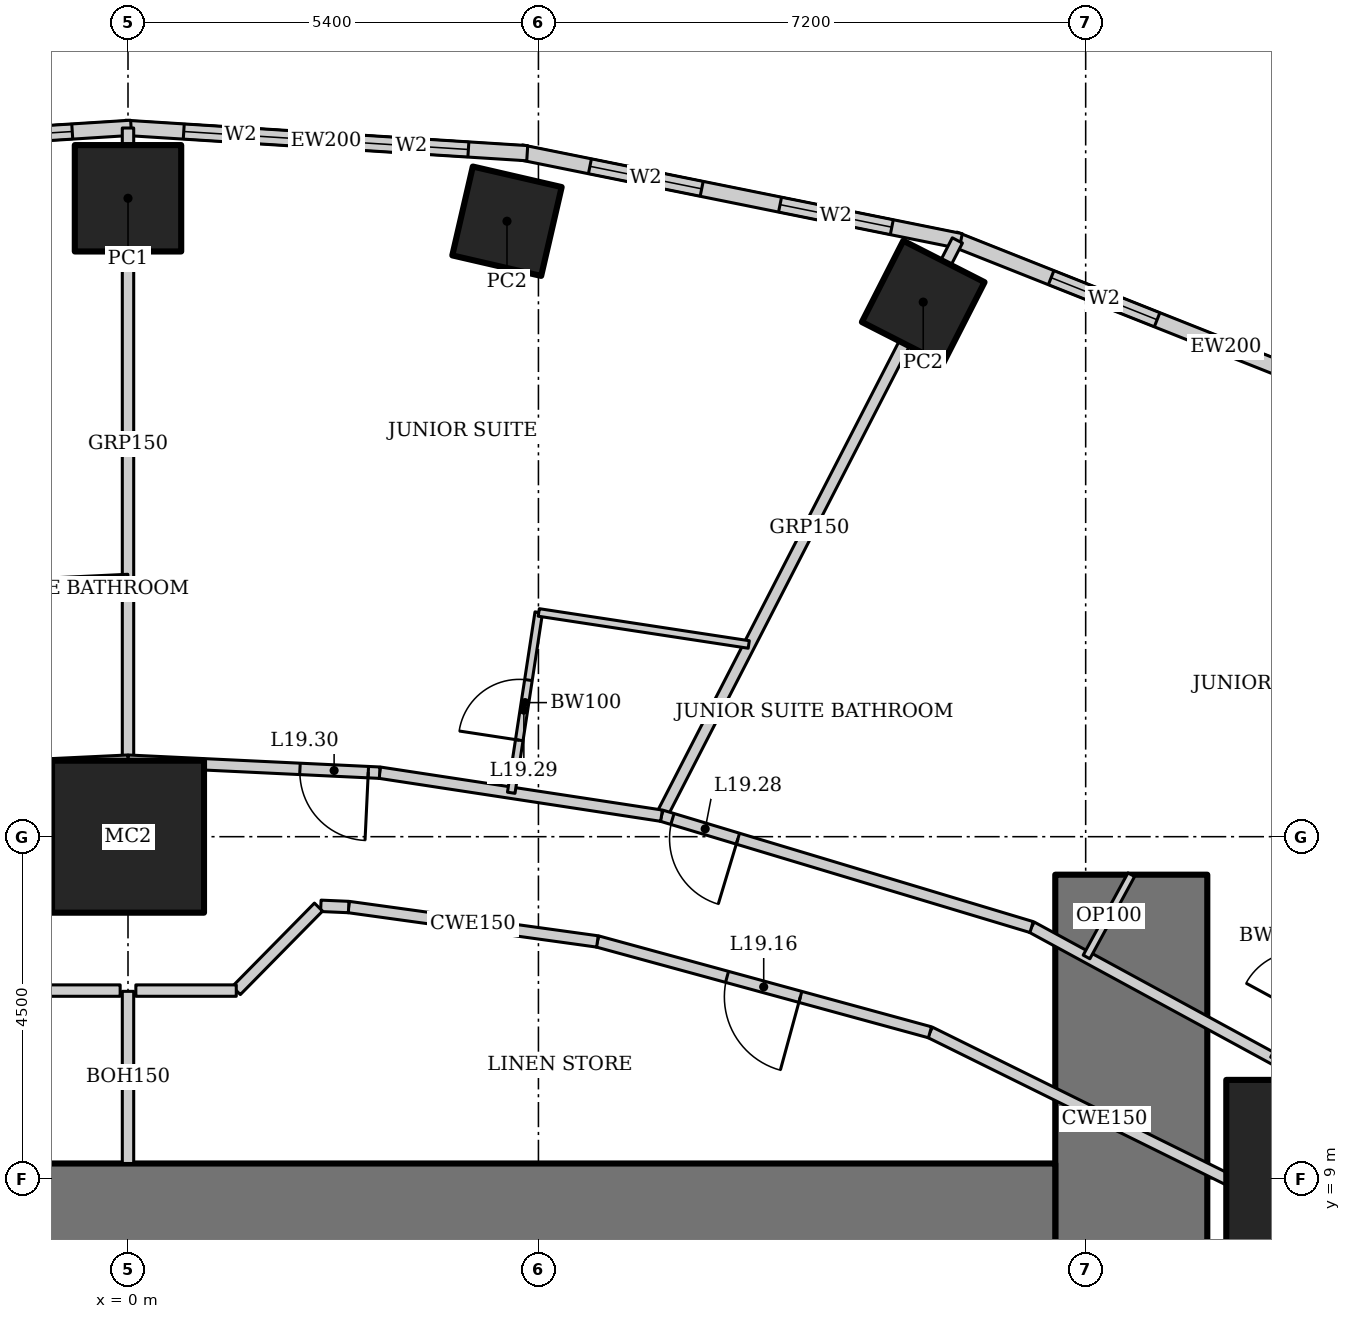
"""IFC4 building model, lengths in metres.
Left out: names, types, materials, properties, quantities, classifications, styles, units other than length and angle.
Written with IfcOpenShell. Run it as: python <this file> out.ifc"""

import sys

from ifc_helpers import new_model, si_unit, direction, frame, frame_2d, origin, origin_2d, place, context, subcontext, project, spatial, rectangle, hollow_rectangle, extrude, element, fill, save


model = new_model("IFC4")
c1 = context("Model", 3, precision=1e-05, world=origin(), true_north=direction((0.0, 1.0)))
c2 = subcontext(c1, "Body", "Model", "MODEL_VIEW")
j1 = project(units=[si_unit("LENGTHUNIT", "METRE"), si_unit("PLANEANGLEUNIT", "RADIAN")], contexts=[c1])
p1 = place(None, origin())
s1 = spatial("IfcSite", under=j1, at=p1, CompositionType="ELEMENT")
p2 = place(p1, origin())
s2 = spatial("IfcBuilding", under=s1, at=p2, CompositionType="ELEMENT")
p3 = place(p2, frame((0.0, 0.0, 83.8)))
s3 = spatial("IfcBuildingStorey", under=s2, at=p3, CompositionType="ELEMENT", Elevation=83.8)
p4 = place(p3, frame((15.75, 9.0, 0.0), z_axis=(0.0, 0.0, 1.0), x_axis=(1.0, 0.0, 0.0)))
e1 = element("IfcColumn", 1, at=p4, inside=s3, PredefinedType="COLUMN", context=c2, shape_type="SweptSolid", body=[
    extrude(hollow_rectangle(XDim=2.6, YDim=2.6, WallThickness=0.13, at=origin_2d()), origin(), (0.0, 0.0, 1.0), 3.6),
])
p5 = place(p3, frame((0.0, 13.5, 0.0), z_axis=(0.0, 0.0, 1.0), x_axis=(1.0, 0.0, 0.0)))
e2 = element("IfcColumn", 2, at=p5, inside=s3, PredefinedType="COLUMN", context=c2, shape_type="SweptSolid", body=[
    extrude(hollow_rectangle(XDim=2.0, YDim=2.0, WallThickness=0.17, at=origin_2d()), origin(), (0.0, 0.0, 1.0), 3.6),
])
for number, where, z_axis, x_axis in (
    (3, (10.463, 20.534, 0.0), (0.0, 0.0, 1.0), (0.454, 0.891, 0.0)),
    (4, (4.986, 21.598, 0.0), (0.0, 0.0, 1.0), (0.225, 0.974, 0.0)),
):
    element("IfcColumn", number, at=place(p3, frame(where, z_axis=z_axis, x_axis=x_axis)), inside=s3, PredefinedType="COLUMN", context=c2, shape_type="SweptSolid", body=[
        extrude(hollow_rectangle(XDim=1.2, YDim=1.2, WallThickness=0.1, at=origin_2d()), origin(), (0.0, 0.0, 1.0), 3.6),
    ])
p6 = place(p3, frame((0.0, 21.9, 0.0), z_axis=(0.0, 0.0, 1.0), x_axis=(1.0, 0.0, 0.0)))
e5 = element("IfcColumn", 5, at=p6, inside=s3, PredefinedType="COLUMN", context=c2, shape_type="SweptSolid", body=[
    extrude(hollow_rectangle(XDim=1.4, YDim=1.4, WallThickness=0.1, at=origin_2d()), origin(), (0.0, 0.0, 1.0), 3.6),
])
p7 = place(p3, frame((13.2, -13.0, 0.0), z_axis=(0.0, 0.0, 1.0), x_axis=(0.0, 1.0, 0.0)))
e6 = element("IfcWall", 6, at=p7, inside=s3, PredefinedType="SHEAR", context=c2, shape_type="SweptSolid", body=[
    extrude(rectangle(XDim=26.0, YDim=2.0, at=frame_2d((13.0, 0.0))), origin(), (0.0, 0.0, 1.0), 3.6),
])
p8 = place(p7, frame((12.1, 0.0, 0.0)))
e7 = element("IfcOpeningElement", 7, at=p8, cuts=e6, PredefinedType="OPENING", context=c2, shape_type="SweptSolid", body=[
    extrude(rectangle(XDim=1.8, YDim=2.1, at=frame_2d((0.9, 1.05))), frame((0.0, 1.01, 0.0), z_axis=(0.0, -1.0, 0.0), x_axis=(1.0, 0.0, 0.0)), (0.0, 0.0, 1.0), 2.02),
])
p9 = place(p3, frame((12.2, 8.0, 0.0), z_axis=(0.0, 0.0, 1.0), x_axis=(-1.0, 0.0, 0.0)))
e8 = element("IfcWall", 8, at=p9, inside=s3, PredefinedType="SHEAR", context=c2, shape_type="SweptSolid", body=[
    extrude(rectangle(XDim=24.4, YDim=2.4, at=frame_2d((12.2, 0.0))), origin(), (0.0, 0.0, 1.0), 3.6),
])
p10 = place(p3, frame((18.018, 18.523, 0.0), z_axis=(0.0, 0.0, 1.0), x_axis=(-0.929358351251, 0.369178892895, 0.0)))
e9 = element("IfcWall", 9, at=p10, inside=s3, PredefinedType="SOLIDWALL", context=c2, shape_type="SweptSolid", body=[
    extrude(rectangle(XDim=7.692, YDim=0.2, at=frame_2d((3.846, 0.0))), origin(), (0.0, 0.0, 1.0), 3.45),
])
p11 = place(p10, frame((1.373, 0.0, 0.5)))
e10 = element("IfcOpeningElement", 10, at=p11, cuts=e9, PredefinedType="OPENING", context=c2, shape_type="SweptSolid", body=[
    extrude(rectangle(XDim=1.5, YDim=2.2, at=frame_2d((0.75, 1.1))), frame((0.0, 0.11, 0.0), z_axis=(0.0, -1.0, 0.0), x_axis=(1.0, 0.0, 0.0)), (0.0, 0.0, 1.0), 0.22),
])
p12 = place(p10, frame((4.819, 0.0, 0.5)))
e11 = element("IfcOpeningElement", 11, at=p12, cuts=e9, PredefinedType="OPENING", context=c2, shape_type="SweptSolid", body=[
    extrude(rectangle(XDim=1.5, YDim=2.2, at=frame_2d((0.75, 1.1))), frame((0.0, 0.11, 0.0), z_axis=(0.0, -1.0, 0.0), x_axis=(1.0, 0.0, 0.0)), (0.0, 0.0, 1.0), 0.22),
])
p13 = place(p3, frame((10.957, 21.337, 0.0), z_axis=(0.0, 0.0, 1.0), x_axis=(-0.980251657452, 0.197754110105, 0.0)))
e12 = element("IfcWall", 12, at=p13, inside=s3, PredefinedType="SOLIDWALL", context=c2, shape_type="SweptSolid", body=[
    extrude(rectangle(XDim=5.904, YDim=0.2, at=frame_2d((2.952, 0.0))), origin(), (0.0, 0.0, 1.0), 3.45),
])
p14 = place(p13, frame((0.926, 0.0, 0.5)))
e13 = element("IfcOpeningElement", 13, at=p14, cuts=e12, PredefinedType="OPENING", context=c2, shape_type="SweptSolid", body=[
    extrude(rectangle(XDim=1.5, YDim=2.2, at=frame_2d((0.75, 1.1))), frame((0.0, 0.11, 0.0), z_axis=(0.0, -1.0, 0.0), x_axis=(1.0, 0.0, 0.0)), (0.0, 0.0, 1.0), 0.22),
])
p15 = place(p13, frame((3.478, 0.0, 0.5)))
e14 = element("IfcOpeningElement", 14, at=p15, cuts=e12, PredefinedType="OPENING", context=c2, shape_type="SweptSolid", body=[
    extrude(rectangle(XDim=1.5, YDim=2.2, at=frame_2d((0.75, 1.1))), frame((0.0, 0.11, 0.0), z_axis=(0.0, -1.0, 0.0), x_axis=(1.0, 0.0, 0.0)), (0.0, 0.0, 1.0), 0.22),
])
p16 = place(p3, frame((5.253, 22.493, 0.0), z_axis=(0.0, 0.0, 1.0), x_axis=(-0.998018582375, 0.062919863585, 0.0)))
e15 = element("IfcWall", 15, at=p16, inside=s3, PredefinedType="SOLIDWALL", context=c2, shape_type="SweptSolid", body=[
    extrude(rectangle(XDim=5.304, YDim=0.2, at=frame_2d((2.652, 0.0))), origin(), (0.0, 0.0, 1.0), 3.45),
])
p17 = place(p16, frame((0.776, 0.0, 0.5)))
e16 = element("IfcOpeningElement", 16, at=p17, cuts=e15, PredefinedType="OPENING", context=c2, shape_type="SweptSolid", body=[
    extrude(rectangle(XDim=1.5, YDim=2.2, at=frame_2d((0.75, 1.1))), frame((0.0, 0.11, 0.0), z_axis=(0.0, -1.0, 0.0), x_axis=(1.0, 0.0, 0.0)), (0.0, 0.0, 1.0), 0.22),
])
p18 = place(p16, frame((3.028, 0.0, 0.5)))
e17 = element("IfcOpeningElement", 17, at=p18, cuts=e15, PredefinedType="OPENING", context=c2, shape_type="SweptSolid", body=[
    extrude(rectangle(XDim=1.5, YDim=2.2, at=frame_2d((0.75, 1.1))), frame((0.0, 0.11, 0.0), z_axis=(0.0, -1.0, 0.0), x_axis=(1.0, 0.0, 0.0)), (0.0, 0.0, 1.0), 0.22),
])
p19 = place(p3, frame((0.041, 22.827, 0.0), z_axis=(0.0, 0.0, 1.0), x_axis=(-0.998018582375, -0.062919863585, 0.0)))
e18 = element("IfcWall", 18, at=p19, inside=s3, PredefinedType="SOLIDWALL", context=c2, shape_type="SweptSolid", body=[
    extrude(rectangle(XDim=5.304, YDim=0.2, at=frame_2d((2.652, 0.0))), origin(), (0.0, 0.0, 1.0), 3.45),
])
p20 = place(p19, frame((0.776, 0.0, 0.5)))
e19 = element("IfcOpeningElement", 19, at=p20, cuts=e18, PredefinedType="OPENING", context=c2, shape_type="SweptSolid", body=[
    extrude(rectangle(XDim=1.5, YDim=2.2, at=frame_2d((0.75, 1.1))), frame((0.0, 0.11, 0.0), z_axis=(0.0, -1.0, 0.0), x_axis=(1.0, 0.0, 0.0)), (0.0, 0.0, 1.0), 0.22),
])
p21 = place(p19, frame((3.028, 0.0, 0.5)))
e20 = element("IfcOpeningElement", 20, at=p21, cuts=e18, PredefinedType="OPENING", context=c2, shape_type="SweptSolid", body=[
    extrude(rectangle(XDim=1.5, YDim=2.2, at=frame_2d((0.75, 1.1))), frame((0.0, 0.11, 0.0), z_axis=(0.0, -1.0, 0.0), x_axis=(1.0, 0.0, 0.0)), (0.0, 0.0, 1.0), 0.22),
])
p22 = place(p3, frame((10.912, 21.346, 0.0), z_axis=(0.0, 0.0, 1.0), x_axis=(-0.457327273085, -0.889298468059, 0.0)))
e21 = element("IfcWall", 21, at=p22, inside=s3, PredefinedType="PARTITIONING", context=c2, shape_type="SweptSolid", body=[
    extrude(rectangle(XDim=8.511, YDim=0.15, at=frame_2d((4.256, 0.0))), origin(), (0.0, 0.0, 1.0), 2.528),
])
p23 = place(p3, frame((0.0, 22.825, 0.0), z_axis=(0.0, 0.0, 1.0), x_axis=(0.0, -1.0, 0.0)))
e22 = element("IfcWall", 22, at=p23, inside=s3, PredefinedType="PARTITIONING", context=c2, shape_type="SweptSolid", body=[
    extrude(rectangle(XDim=8.325, YDim=0.15, at=frame_2d((4.162, 0.0))), origin(), (0.0, 0.0, 1.0), 2.924),
])
p24 = place(p3, frame((16.835, 9.62, 0.0), z_axis=(0.0, 0.0, 1.0), x_axis=(-0.878450059298, 0.477834169267, 0.0)))
e23 = element("IfcWall", 23, at=p24, inside=s3, PredefinedType="PARTITIONING", context=c2, shape_type="SweptSolid", body=[
    extrude(rectangle(XDim=5.631, YDim=0.15, at=frame_2d((2.815, 0.0))), origin(), (0.0, 0.0, 1.0), 3.45),
])
p25 = place(p3, frame((11.888, 12.311, 0.0), z_axis=(0.0, 0.0, 1.0), x_axis=(-0.957564241242, 0.288219922793, 0.0)))
e24 = element("IfcWall", 24, at=p25, inside=s3, PredefinedType="PARTITIONING", context=c2, shape_type="SweptSolid", body=[
    extrude(rectangle(XDim=5.085, YDim=0.15, at=frame_2d((2.542, 0.0))), origin(), (0.0, 0.0, 1.0), 3.45),
])
p26 = place(p25, frame((4.035, 0.0, 0.0)))
e25 = element("IfcOpeningElement", 25, at=p26, cuts=e24, PredefinedType="OPENING", context=c2, shape_type="SweptSolid", body=[
    extrude(rectangle(XDim=0.9, YDim=2.1, at=frame_2d((0.45, 1.05))), frame((0.0, 0.085, 0.0), z_axis=(0.0, -1.0, 0.0), x_axis=(1.0, 0.0, 0.0)), (0.0, 0.0, 1.0), 0.17),
])
p27 = place(p3, frame((7.019, 13.776, 0.0), z_axis=(0.0, 0.0, 1.0), x_axis=(-0.988564270062, 0.150800145746, 0.0)))
e26 = element("IfcWall", 26, at=p27, inside=s3, PredefinedType="PARTITIONING", context=c2, shape_type="SweptSolid", body=[
    extrude(rectangle(XDim=3.751, YDim=0.15, at=frame_2d((1.875, 0.0))), origin(), (0.0, 0.0, 1.0), 3.45),
])
p28 = place(p3, frame((3.311, 14.342, 0.0), z_axis=(0.0, 0.0, 1.0), x_axis=(-0.998863968075, 0.047652631422, 0.0)))
e27 = element("IfcWall", 27, at=p28, inside=s3, PredefinedType="PARTITIONING", context=c2, shape_type="SweptSolid", body=[
    extrude(rectangle(XDim=3.315, YDim=0.15, at=frame_2d((1.657, 0.0))), origin(), (0.0, 0.0, 1.0), 3.45),
])
p29 = place(p28, frame((0.15, 0.0, 0.0)))
e28 = element("IfcOpeningElement", 28, at=p29, cuts=e27, PredefinedType="OPENING", context=c2, shape_type="SweptSolid", body=[
    extrude(rectangle(XDim=0.9, YDim=2.1, at=frame_2d((0.45, 1.05))), frame((0.0, 0.085, 0.0), z_axis=(0.0, -1.0, 0.0), x_axis=(1.0, 0.0, 0.0)), (0.0, 0.0, 1.0), 0.17),
])
p30 = place(p3, frame((0.0, 14.5, 0.0), z_axis=(0.0, 0.0, 1.0), x_axis=(-0.998863968075, -0.047652631422, 0.0)))
e29 = element("IfcWall", 29, at=p30, inside=s3, PredefinedType="PARTITIONING", context=c2, shape_type="SweptSolid", body=[
    extrude(rectangle(XDim=3.315, YDim=0.15, at=frame_2d((1.657, 0.0))), origin(), (0.0, 0.0, 1.0), 3.45),
])
p31 = place(p3, frame((15.147, 8.656, 0.0), z_axis=(0.0, 0.0, 1.0), x_axis=(-0.89656943448, 0.442903205177, 0.0)))
e30 = element("IfcWall", 30, at=p31, inside=s3, PredefinedType="PARTITIONING", context=c2, shape_type="SweptSolid", body=[
    extrude(rectangle(XDim=5.126, YDim=0.15, at=frame_2d((2.563, 0.0))), origin(), (0.0, 0.0, 1.0), 3.45),
])
p32 = place(p3, frame((10.551, 10.926, 0.0), z_axis=(0.0, 0.0, 1.0), x_axis=(-0.964644466646, 0.263554648923, 0.0)))
e31 = element("IfcWall", 31, at=p32, inside=s3, PredefinedType="PARTITIONING", context=c2, shape_type="SweptSolid", body=[
    extrude(rectangle(XDim=4.535, YDim=0.15, at=frame_2d((2.268, 0.0))), origin(), (0.0, 0.0, 1.0), 3.45),
])
p33 = place(p32, frame((1.768, 0.0, 0.0)))
e32 = element("IfcOpeningElement", 32, at=p33, cuts=e31, PredefinedType="OPENING", context=c2, shape_type="SweptSolid", body=[
    extrude(rectangle(XDim=1.0, YDim=2.1, at=frame_2d((0.5, 1.05))), frame((0.0, 0.085, 0.0), z_axis=(0.0, -1.0, 0.0), x_axis=(1.0, 0.0, 0.0)), (0.0, 0.0, 1.0), 0.17),
])
p34 = place(p3, frame((6.176, 12.122, 0.0), z_axis=(0.0, 0.0, 1.0), x_axis=(-0.990563451353, 0.137054911782, 0.0)))
e33 = element("IfcWall", 33, at=p34, inside=s3, PredefinedType="PARTITIONING", context=c2, shape_type="SweptSolid", body=[
    extrude(rectangle(XDim=3.304, YDim=0.15, at=frame_2d((1.652, 0.0))), origin(), (0.0, 0.0, 1.0), 3.45),
])
p35 = place(p3, frame((15.078, 10.576, 0.0), z_axis=(0.0, 0.0, 1.0), x_axis=(0.477832549678, 0.878450940274, 0.0)))
e34 = element("IfcWall", 34, at=p35, inside=s3, PredefinedType="PARTITIONING", context=c2, shape_type="SweptSolid", body=[
    extrude(rectangle(XDim=2.4, YDim=0.1, at=frame_2d((1.2, 0.0))), origin(), (0.0, 0.0, 1.0), 3.45),
])
p36 = place(p35, frame((0.7, 0.0, 0.0)))
e35 = element("IfcOpeningElement", 35, at=p36, cuts=e34, PredefinedType="OPENING", context=c2, shape_type="SweptSolid", body=[
    extrude(rectangle(XDim=0.8, YDim=2.1, at=frame_2d((0.4, 1.05))), frame((0.0, 0.06, 0.0), z_axis=(0.0, -1.0, 0.0), x_axis=(1.0, 0.0, 0.0)), (0.0, 0.0, 1.0), 0.12),
])
p37 = place(p3, frame((5.042, 14.078, 0.0), z_axis=(0.0, 0.0, 1.0), x_axis=(0.150856962013, 0.988555601376, 0.0)))
e36 = element("IfcWall", 36, at=p37, inside=s3, PredefinedType="PARTITIONING", context=c2, shape_type="SweptSolid", body=[
    extrude(rectangle(XDim=2.4, YDim=0.1, at=frame_2d((1.2, 0.0))), origin(), (0.0, 0.0, 1.0), 3.45),
])
p38 = place(p37, frame((0.7, 0.0, 0.0)))
e37 = element("IfcOpeningElement", 37, at=p38, cuts=e36, PredefinedType="OPENING", context=c2, shape_type="SweptSolid", body=[
    extrude(rectangle(XDim=0.8, YDim=2.1, at=frame_2d((0.4, 1.05))), frame((0.0, 0.06, 0.0), z_axis=(0.0, -1.0, 0.0), x_axis=(1.0, 0.0, 0.0)), (0.0, 0.0, 1.0), 0.12),
])
p39 = place(p3, frame((5.404, 16.45, 0.0), z_axis=(0.0, 0.0, 1.0), x_axis=(0.988568792086, -0.150770498819, 0.0)))
e38 = element("IfcWall", 38, at=p39, inside=s3, PredefinedType="PARTITIONING", context=c2, shape_type="SweptSolid", body=[
    extrude(rectangle(XDim=2.795, YDim=0.1, at=frame_2d((1.397, 0.0))), origin(), (0.0, 0.0, 1.0), 3.45),
])
p40 = place(p3, frame((-2.112, 16.802, 0.0), z_axis=(0.0, 0.0, 1.0), x_axis=(0.998862383453, 0.047685835668, 0.0)))
e39 = element("IfcWall", 39, at=p40, inside=s3, PredefinedType="PARTITIONING", context=c2, shape_type="SweptSolid", body=[
    extrude(rectangle(XDim=2.115, YDim=0.1, at=frame_2d((1.057, 0.0))), origin(), (0.0, 0.0, 1.0), 3.45),
])
p41 = place(p3, frame((13.2, 13.0, 0.0), z_axis=(0.0, 0.0, 1.0), x_axis=(-0.477852414256, -0.878440134665, 0.0)))
e40 = element("IfcWall", 40, at=p41, inside=s3, PredefinedType="PARTITIONING", context=c2, shape_type="SweptSolid", body=[
    extrude(rectangle(XDim=1.232, YDim=0.1, at=frame_2d((0.616, 0.0))), origin(), (0.0, 0.0, 1.0), 3.45),
])
p42 = place(p3, frame((2.903, 12.574, 0.0), z_axis=(0.0, 0.0, 1.0), x_axis=(-0.999061181733, 0.04332153223, 0.0)))
e41 = element("IfcWall", 41, at=p42, inside=s3, PredefinedType="PARTITIONING", context=c2, shape_type="SweptSolid", body=[
    extrude(rectangle(XDim=0.366, YDim=0.15, at=frame_2d((0.183, 0.0))), origin(), (0.0, 0.0, 1.0), 3.45),
])
p43 = place(p3, frame((0.0, 9.2, 0.0), z_axis=(0.0, 0.0, 1.0), x_axis=(0.0, 1.0, 0.0)))
e42 = element("IfcWall", 42, at=p43, inside=s3, PredefinedType="PARTITIONING", context=c2, shape_type="SweptSolid", body=[
    extrude(rectangle(XDim=2.265, YDim=0.15, at=frame_2d((1.133, 0.0))), origin(), (0.0, 0.0, 1.0), 3.043),
])
p44 = place(p3, frame((2.506, 12.574, 0.0), z_axis=(0.0, 0.0, 1.0), x_axis=(-0.701622806479, -0.712548550927, 0.0)))
e43 = element("IfcWall", 43, at=p44, inside=s3, PredefinedType="PARTITIONING", context=c2, shape_type="SweptSolid", body=[
    extrude(rectangle(XDim=1.542, YDim=0.15, at=frame_2d((0.771, 0.0))), origin(), (0.0, 0.0, 1.0), 3.45),
])
for number, where, z_axis, x_axis in (
    (44, (1.425, 11.475, 0.0), (0.0, 0.0, 1.0), (-1.0, 0.0, 0.0)),
    (45, (-0.103, 11.475, 0.0), (0.0, 0.0, 1.0), (-1.0, 0.0, 0.0)),
):
    element("IfcWall", number, at=place(p3, frame(where, z_axis=z_axis, x_axis=x_axis)), inside=s3, PredefinedType="PARTITIONING", context=c2, shape_type="SweptSolid", body=[
        extrude(rectangle(XDim=1.321, YDim=0.15, at=frame_2d((0.661, 0.0))), origin(), (0.0, 0.0, 1.0), 3.45),
    ])
p45 = place(p12, origin())
e46 = element("IfcWindow", 46, at=p45, inside=s3, PartitioningType="SINGLE_PANEL", PredefinedType="WINDOW", context=c2, shape_type="SweptSolid", body=[
    extrude(rectangle(XDim=1.5, YDim=2.2, at=frame_2d((0.75, 1.1))), frame((0.0, 0.03, 0.0), z_axis=(0.0, -1.0, 0.0), x_axis=(1.0, 0.0, 0.0)), (0.0, 0.0, 1.0), 0.06),
])
fill(e11, e46)
p46 = place(p14, origin())
e47 = element("IfcWindow", 47, at=p46, inside=s3, PartitioningType="SINGLE_PANEL", PredefinedType="WINDOW", context=c2, shape_type="SweptSolid", body=[
    extrude(rectangle(XDim=1.5, YDim=2.2, at=frame_2d((0.75, 1.1))), frame((0.0, 0.03, 0.0), z_axis=(0.0, -1.0, 0.0), x_axis=(1.0, 0.0, 0.0)), (0.0, 0.0, 1.0), 0.06),
])
fill(e13, e47)
p47 = place(p15, origin())
e48 = element("IfcWindow", 48, at=p47, inside=s3, PartitioningType="SINGLE_PANEL", PredefinedType="WINDOW", context=c2, shape_type="SweptSolid", body=[
    extrude(rectangle(XDim=1.5, YDim=2.2, at=frame_2d((0.75, 1.1))), frame((0.0, 0.03, 0.0), z_axis=(0.0, -1.0, 0.0), x_axis=(1.0, 0.0, 0.0)), (0.0, 0.0, 1.0), 0.06),
])
fill(e14, e48)
p48 = place(p17, origin())
e49 = element("IfcWindow", 49, at=p48, inside=s3, PartitioningType="SINGLE_PANEL", PredefinedType="WINDOW", context=c2, shape_type="SweptSolid", body=[
    extrude(rectangle(XDim=1.5, YDim=2.2, at=frame_2d((0.75, 1.1))), frame((0.0, 0.03, 0.0), z_axis=(0.0, -1.0, 0.0), x_axis=(1.0, 0.0, 0.0)), (0.0, 0.0, 1.0), 0.06),
])
fill(e16, e49)
p49 = place(p18, origin())
e50 = element("IfcWindow", 50, at=p49, inside=s3, PartitioningType="SINGLE_PANEL", PredefinedType="WINDOW", context=c2, shape_type="SweptSolid", body=[
    extrude(rectangle(XDim=1.5, YDim=2.2, at=frame_2d((0.75, 1.1))), frame((0.0, 0.03, 0.0), z_axis=(0.0, -1.0, 0.0), x_axis=(1.0, 0.0, 0.0)), (0.0, 0.0, 1.0), 0.06),
])
fill(e17, e50)
p50 = place(p20, origin())
e51 = element("IfcWindow", 51, at=p50, inside=s3, PartitioningType="SINGLE_PANEL", PredefinedType="WINDOW", context=c2, shape_type="SweptSolid", body=[
    extrude(rectangle(XDim=1.5, YDim=2.2, at=frame_2d((0.75, 1.1))), frame((0.0, 0.03, 0.0), z_axis=(0.0, -1.0, 0.0), x_axis=(1.0, 0.0, 0.0)), (0.0, 0.0, 1.0), 0.06),
])
fill(e19, e51)
p51 = place(p33, origin())
e52 = element("IfcDoor", 52, at=p51, inside=s3, OperationType="SINGLE_SWING_LEFT", PredefinedType="DOOR", context=c2, shape_type="SweptSolid", body=[
    extrude(rectangle(XDim=1.0, YDim=2.1, at=frame_2d((0.5, 1.05))), frame((0.0, 0.025, 0.0), z_axis=(0.0, -1.0, 0.0), x_axis=(1.0, 0.0, 0.0)), (0.0, 0.0, 1.0), 0.05),
])
fill(e32, e52)
p52 = place(p26, origin())
e53 = element("IfcDoor", 53, at=p52, inside=s3, OperationType="SINGLE_SWING_LEFT", PredefinedType="DOOR", context=c2, shape_type="SweptSolid", body=[
    extrude(rectangle(XDim=0.9, YDim=2.1, at=frame_2d((0.45, 1.05))), frame((0.0, 0.025, 0.0), z_axis=(0.0, -1.0, 0.0), x_axis=(1.0, 0.0, 0.0)), (0.0, 0.0, 1.0), 0.05),
])
fill(e25, e53)
p53 = place(p38, origin())
e54 = element("IfcDoor", 54, at=p53, inside=s3, OperationType="SINGLE_SWING_LEFT", PredefinedType="DOOR", context=c2, shape_type="SweptSolid", body=[
    extrude(rectangle(XDim=0.8, YDim=2.1, at=frame_2d((0.4, 1.05))), frame((0.0, 0.025, 0.0), z_axis=(0.0, -1.0, 0.0), x_axis=(1.0, 0.0, 0.0)), (0.0, 0.0, 1.0), 0.05),
])
fill(e37, e54)
p54 = place(p29, origin())
e55 = element("IfcDoor", 55, at=p54, inside=s3, OperationType="SINGLE_SWING_LEFT", PredefinedType="DOOR", context=c2, shape_type="SweptSolid", body=[
    extrude(rectangle(XDim=0.9, YDim=2.1, at=frame_2d((0.45, 1.05))), frame((0.0, 0.025, 0.0), z_axis=(0.0, -1.0, 0.0), x_axis=(1.0, 0.0, 0.0)), (0.0, 0.0, 1.0), 0.05),
])
fill(e28, e55)
save(model, sys.argv[1])
